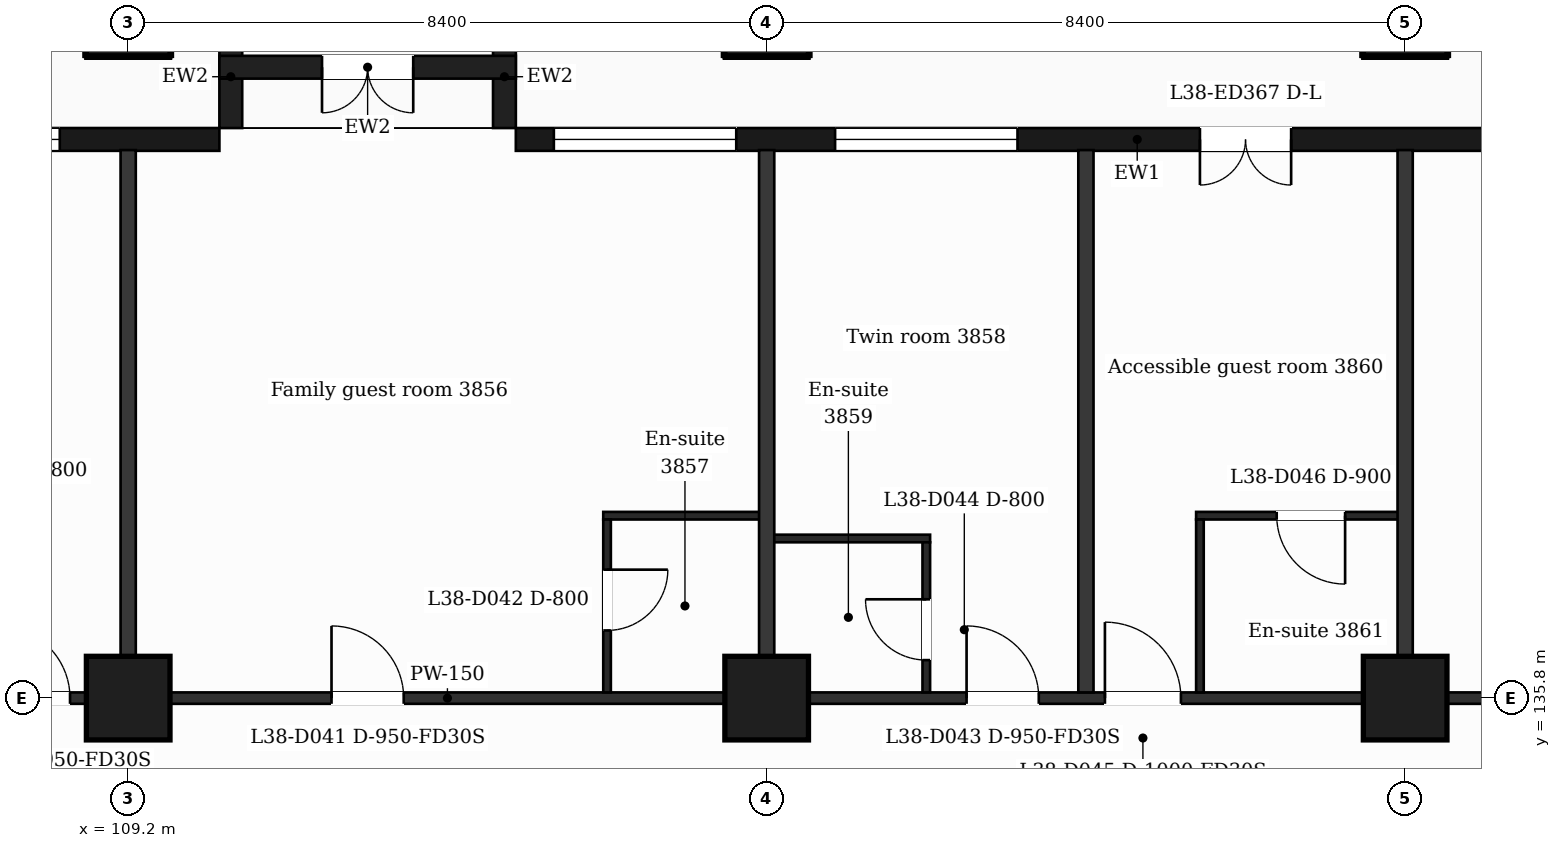
"""IFC4 building model, lengths in metres.
Left out: names, types, materials, properties, quantities, classifications, styles, units other than length and angle.
Written with IfcOpenShell. Run it as: python <this file> out.ifc"""

import sys

from ifc_helpers import new_model, si_unit, direction, frame, frame_2d, origin, origin_2d, place, context, subcontext, project, spatial, rectangle, extrude, element, fill, save


model = new_model("IFC4")
c1 = context("Model", 3, precision=1e-05, world=origin(), true_north=direction((0.0, 1.0)))
c2 = subcontext(c1, "Body", "Model", "MODEL_VIEW")
j1 = project(units=[si_unit("LENGTHUNIT", "METRE"), si_unit("PLANEANGLEUNIT", "RADIAN")], contexts=[c1])
p1 = place(None, origin())
s1 = spatial("IfcSite", under=j1, at=p1, CompositionType="ELEMENT")
p2 = place(p1, origin())
s2 = spatial("IfcBuilding", under=s1, at=p2, CompositionType="ELEMENT")
p3 = place(p2, frame((0.0, 0.0, 162.6)))
s3 = spatial("IfcBuildingStorey", under=s2, at=p3, CompositionType="ELEMENT", Elevation=162.6)
for number, where, z_axis, x_axis in (
    (1, (109.2, 135.8, 0.0), (0.0, 0.0, 1.0), (1.0, 0.0, 0.0)),
    (2, (117.6, 135.8, 0.0), (0.0, 0.0, 1.0), (1.0, 0.0, 0.0)),
    (3, (126.0, 135.8, 0.0), (0.0, 0.0, 1.0), (1.0, 0.0, 0.0)),
    (4, (109.2, 144.8, 0.0), (0.0, 0.0, 1.0), (1.0, 0.0, 0.0)),
    (5, (117.6, 144.8, 0.0), (0.0, 0.0, 1.0), (1.0, 0.0, 0.0)),
    (6, (126.0, 144.8, 0.0), (0.0, 0.0, 1.0), (1.0, 0.0, 0.0)),
):
    element("IfcColumn", number, at=place(p3, frame(where, z_axis=z_axis, x_axis=x_axis)), inside=s3, PredefinedType="COLUMN", context=c2, shape_type="SweptSolid", body=[
        extrude(rectangle(XDim=1.1, YDim=1.1, at=origin_2d()), origin(), (0.0, 0.0, 1.0), 3.7),
    ])
p4 = place(p3, frame((130.65, 143.15, 0.0), z_axis=(0.0, 0.0, 1.0), x_axis=(-1.0, 0.0, 0.0)))
e7 = element("IfcWall", 7, at=p4, inside=s3, PredefinedType="SOLIDWALL", context=c2, shape_type="SweptSolid", body=[
    extrude(rectangle(XDim=16.35, YDim=0.3, at=frame_2d((8.175, 0.0))), origin(), (0.0, 0.0, 1.0), 3.38),
])
p5 = place(p4, frame((1.95, 0.0, 0.9)))
e8 = element("IfcOpeningElement", 8, at=p5, cuts=e7, PredefinedType="OPENING", context=c2, shape_type="SweptSolid", body=[
    extrude(rectangle(XDim=1.2, YDim=2.1, at=frame_2d((0.6, 1.05))), frame((0.0, 0.16, 0.0), z_axis=(0.0, -1.0, 0.0), x_axis=(1.0, 0.0, 0.0)), (0.0, 0.0, 1.0), 0.32),
])
p6 = place(p4, frame((6.15, 0.0, 0.0)))
e9 = element("IfcOpeningElement", 9, at=p6, cuts=e7, PredefinedType="OPENING", context=c2, shape_type="SweptSolid", body=[
    extrude(rectangle(XDim=1.2, YDim=2.4, at=frame_2d((0.6, 1.2))), frame((0.0, 0.16, 0.0), z_axis=(0.0, -1.0, 0.0), x_axis=(1.0, 0.0, 0.0)), (0.0, 0.0, 1.0), 0.32),
])
p7 = place(p4, frame((9.75, 0.0, 0.9)))
e10 = element("IfcOpeningElement", 10, at=p7, cuts=e7, PredefinedType="OPENING", context=c2, shape_type="SweptSolid", body=[
    extrude(rectangle(XDim=2.4, YDim=2.1, at=frame_2d((1.2, 1.05))), frame((0.0, 0.16, 0.0), z_axis=(0.0, -1.0, 0.0), x_axis=(1.0, 0.0, 0.0)), (0.0, 0.0, 1.0), 0.32),
])
p8 = place(p4, frame((13.45, 0.0, 0.9)))
e11 = element("IfcOpeningElement", 11, at=p8, cuts=e7, PredefinedType="OPENING", context=c2, shape_type="SweptSolid", body=[
    extrude(rectangle(XDim=2.4, YDim=2.1, at=frame_2d((1.2, 1.05))), frame((0.0, 0.16, 0.0), z_axis=(0.0, -1.0, 0.0), x_axis=(1.0, 0.0, 0.0)), (0.0, 0.0, 1.0), 0.32),
])
p9 = place(p3, frame((110.4, 143.15, 0.0), z_axis=(0.0, 0.0, 1.0), x_axis=(-1.0, 0.0, 0.0)))
e12 = element("IfcWall", 12, at=p9, inside=s3, PredefinedType="SOLIDWALL", context=c2, shape_type="SweptSolid", body=[
    extrude(rectangle(XDim=14.4, YDim=0.3, at=frame_2d((7.2, 0.0))), origin(), (0.0, 0.0, 1.0), 3.38),
])
p10 = place(p9, frame((2.1, 0.0, 0.9)))
e13 = element("IfcOpeningElement", 13, at=p10, cuts=e12, PredefinedType="OPENING", context=c2, shape_type="SweptSolid", body=[
    extrude(rectangle(XDim=2.4, YDim=2.1, at=frame_2d((1.2, 1.05))), frame((0.0, 0.16, 0.0), z_axis=(0.0, -1.0, 0.0), x_axis=(1.0, 0.0, 0.0)), (0.0, 0.0, 1.0), 0.32),
])
p11 = place(p9, frame((6.9, 0.0, 0.0)))
e14 = element("IfcOpeningElement", 14, at=p11, cuts=e12, PredefinedType="OPENING", context=c2, shape_type="SweptSolid", body=[
    extrude(rectangle(XDim=1.2, YDim=2.4, at=frame_2d((0.6, 1.2))), frame((0.0, 0.16, 0.0), z_axis=(0.0, -1.0, 0.0), x_axis=(1.0, 0.0, 0.0)), (0.0, 0.0, 1.0), 0.32),
])
p12 = place(p9, frame((11.1, 0.0, 0.9)))
e15 = element("IfcOpeningElement", 15, at=p12, cuts=e12, PredefinedType="OPENING", context=c2, shape_type="SweptSolid", body=[
    extrude(rectangle(XDim=1.2, YDim=2.1, at=frame_2d((0.6, 1.05))), frame((0.0, 0.16, 0.0), z_axis=(0.0, -1.0, 0.0), x_axis=(1.0, 0.0, 0.0)), (0.0, 0.0, 1.0), 0.32),
])
for number, where, z_axis, x_axis in (
    (16, (114.15, 143.3, 0.0), (0.0, 0.0, 1.0), (0.0, 1.0, 0.0)),
    (17, (110.55, 143.3, 0.0), (0.0, 0.0, 1.0), (0.0, 1.0, 0.0)),
):
    element("IfcWall", number, at=place(p3, frame(where, z_axis=z_axis, x_axis=x_axis)), inside=s3, PredefinedType="SOLIDWALL", context=c2, shape_type="SweptSolid", body=[
        extrude(rectangle(XDim=1.35, YDim=0.3, at=frame_2d((0.675, 0.0))), origin(), (0.0, 0.0, 1.0), 3.38),
    ])
p13 = place(p3, frame((114.3, 144.1, 0.0), z_axis=(0.0, 0.0, 1.0), x_axis=(-1.0, 0.0, 0.0)))
e18 = element("IfcWall", 18, at=p13, inside=s3, PredefinedType="SOLIDWALL", context=c2, shape_type="SweptSolid", body=[
    extrude(rectangle(XDim=3.9, YDim=0.3, at=frame_2d((1.95, 0.0))), origin(), (0.0, 0.0, 1.0), 3.38),
])
p14 = place(p13, frame((1.35, 0.0, 0.0)))
e19 = element("IfcOpeningElement", 19, at=p14, cuts=e18, PredefinedType="OPENING", context=c2, shape_type="SweptSolid", body=[
    extrude(rectangle(XDim=1.2, YDim=2.4, at=frame_2d((0.6, 1.2))), frame((0.0, 0.16, 0.0), z_axis=(0.0, -1.0, 0.0), x_axis=(1.0, 0.0, 0.0)), (0.0, 0.0, 1.0), 0.32),
])
p15 = place(p3, frame((90.895, 135.8, 0.0), z_axis=(0.0, 0.0, 1.0), x_axis=(1.0, 0.0, 0.0)))
e20 = element("IfcWall", 20, at=p15, inside=s3, PredefinedType="PARTITIONING", context=c2, shape_type="SweptSolid", body=[
    extrude(rectangle(XDim=45.011, YDim=0.15, at=frame_2d((22.505, 0.0))), origin(), (0.0, 0.0, 1.0), 3.38),
])
p16 = place(p15, frame((8.005, 0.0, 0.0)))
e21 = element("IfcOpeningElement", 21, at=p16, cuts=e20, PredefinedType="OPENING", context=c2, shape_type="SweptSolid", body=[
    extrude(rectangle(XDim=1.0, YDim=2.1, at=frame_2d((0.5, 1.05))), frame((0.0, 0.085, 0.0), z_axis=(0.0, -1.0, 0.0), x_axis=(1.0, 0.0, 0.0)), (0.0, 0.0, 1.0), 0.17),
])
p17 = place(p15, frame((10.67, 0.0, 0.0)))
e22 = element("IfcOpeningElement", 22, at=p17, cuts=e20, PredefinedType="OPENING", context=c2, shape_type="SweptSolid", body=[
    extrude(rectangle(XDim=0.95, YDim=2.1, at=frame_2d((0.475, 1.05))), frame((0.0, 0.085, 0.0), z_axis=(0.0, -1.0, 0.0), x_axis=(1.0, 0.0, 0.0)), (0.0, 0.0, 1.0), 0.17),
])
p18 = place(p15, frame((16.59, 0.0, 0.0)))
e23 = element("IfcOpeningElement", 23, at=p18, cuts=e20, PredefinedType="OPENING", context=c2, shape_type="SweptSolid", body=[
    extrude(rectangle(XDim=0.95, YDim=2.1, at=frame_2d((0.475, 1.05))), frame((0.0, 0.085, 0.0), z_axis=(0.0, -1.0, 0.0), x_axis=(1.0, 0.0, 0.0)), (0.0, 0.0, 1.0), 0.17),
])
p19 = place(p15, frame((20.98, 0.0, 0.0)))
e24 = element("IfcOpeningElement", 24, at=p19, cuts=e20, PredefinedType="OPENING", context=c2, shape_type="SweptSolid", body=[
    extrude(rectangle(XDim=0.95, YDim=2.1, at=frame_2d((0.475, 1.05))), frame((0.0, 0.085, 0.0), z_axis=(0.0, -1.0, 0.0), x_axis=(1.0, 0.0, 0.0)), (0.0, 0.0, 1.0), 0.17),
])
p20 = place(p15, frame((29.335, 0.0, 0.0)))
e25 = element("IfcOpeningElement", 25, at=p20, cuts=e20, PredefinedType="OPENING", context=c2, shape_type="SweptSolid", body=[
    extrude(rectangle(XDim=0.95, YDim=2.1, at=frame_2d((0.475, 1.05))), frame((0.0, 0.085, 0.0), z_axis=(0.0, -1.0, 0.0), x_axis=(1.0, 0.0, 0.0)), (0.0, 0.0, 1.0), 0.17),
])
p21 = place(p15, frame((31.156, 0.0, 0.0)))
e26 = element("IfcOpeningElement", 26, at=p21, cuts=e20, PredefinedType="OPENING", context=c2, shape_type="SweptSolid", body=[
    extrude(rectangle(XDim=1.0, YDim=2.1, at=frame_2d((0.5, 1.05))), frame((0.0, 0.085, 0.0), z_axis=(0.0, -1.0, 0.0), x_axis=(1.0, 0.0, 0.0)), (0.0, 0.0, 1.0), 0.17),
])
p22 = place(p15, frame((39.814, 0.0, 0.0)))
e27 = element("IfcOpeningElement", 27, at=p22, cuts=e20, PredefinedType="OPENING", context=c2, shape_type="SweptSolid", body=[
    extrude(rectangle(XDim=0.95, YDim=2.1, at=frame_2d((0.475, 1.05))), frame((0.0, 0.085, 0.0), z_axis=(0.0, -1.0, 0.0), x_axis=(1.0, 0.0, 0.0)), (0.0, 0.0, 1.0), 0.17),
])
p23 = place(p3, frame((117.6, 137.9, 0.0), z_axis=(0.0, 0.0, 1.0), x_axis=(1.0, 0.0, 0.0)))
e28 = element("IfcWall", 28, at=p23, inside=s3, PredefinedType="PARTITIONING", context=c2, shape_type="SweptSolid", body=[
    extrude(rectangle(XDim=2.15, YDim=0.1, at=frame_2d((1.075, 0.0))), origin(), (0.0, 0.0, 1.0), 3.38),
])
p24 = place(p3, frame((115.45, 138.2, 0.0), z_axis=(0.0, 0.0, 1.0), x_axis=(1.0, 0.0, 0.0)))
e29 = element("IfcWall", 29, at=p24, inside=s3, PredefinedType="PARTITIONING", context=c2, shape_type="SweptSolid", body=[
    extrude(rectangle(XDim=2.15, YDim=0.1, at=frame_2d((1.075, 0.0))), origin(), (0.0, 0.0, 1.0), 3.38),
])
p25 = place(p3, frame((123.25, 138.2, 0.0), z_axis=(0.0, 0.0, 1.0), x_axis=(1.0, 0.0, 0.0)))
e30 = element("IfcWall", 30, at=p25, inside=s3, PredefinedType="PARTITIONING", context=c2, shape_type="SweptSolid", body=[
    extrude(rectangle(XDim=2.75, YDim=0.1, at=frame_2d((1.375, 0.0))), origin(), (0.0, 0.0, 1.0), 3.38),
])
p26 = place(p25, frame((1.06, 0.0, 0.0)))
e31 = element("IfcOpeningElement", 31, at=p26, cuts=e30, PredefinedType="OPENING", context=c2, shape_type="SweptSolid", body=[
    extrude(rectangle(XDim=0.9, YDim=2.1, at=frame_2d((0.45, 1.05))), frame((0.0, 0.06, 0.0), z_axis=(0.0, -1.0, 0.0), x_axis=(1.0, 0.0, 0.0)), (0.0, 0.0, 1.0), 0.12),
])
p27 = place(p3, frame((109.2, 135.875, 0.0), z_axis=(0.0, 0.0, 1.0), x_axis=(0.0, 1.0, 0.0)))
e32 = element("IfcWall", 32, at=p27, inside=s3, PredefinedType="PARTITIONING", context=c2, shape_type="SweptSolid", body=[
    extrude(rectangle(XDim=7.135, YDim=0.2, at=frame_2d((3.567, 0.0))), origin(), (0.0, 0.0, 1.0), 3.38),
])
p28 = place(p3, frame((115.5, 135.875, 0.0), z_axis=(0.0, 0.0, 1.0), x_axis=(0.0, 1.0, 0.0)))
e33 = element("IfcWall", 33, at=p28, inside=s3, PredefinedType="PARTITIONING", context=c2, shape_type="SweptSolid", body=[
    extrude(rectangle(XDim=2.275, YDim=0.1, at=frame_2d((1.137, 0.0))), origin(), (0.0, 0.0, 1.0), 3.38),
])
p29 = place(p28, frame((0.815, 0.0, 0.0)))
e34 = element("IfcOpeningElement", 34, at=p29, cuts=e33, PredefinedType="OPENING", context=c2, shape_type="SweptSolid", body=[
    extrude(rectangle(XDim=0.8, YDim=2.1, at=frame_2d((0.4, 1.05))), frame((0.0, 0.06, 0.0), z_axis=(0.0, -1.0, 0.0), x_axis=(1.0, 0.0, 0.0)), (0.0, 0.0, 1.0), 0.12),
])
p30 = place(p3, frame((117.6, 135.875, 0.0), z_axis=(0.0, 0.0, 1.0), x_axis=(0.0, 1.0, 0.0)))
e35 = element("IfcWall", 35, at=p30, inside=s3, PredefinedType="PARTITIONING", context=c2, shape_type="SweptSolid", body=[
    extrude(rectangle(XDim=7.135, YDim=0.2, at=frame_2d((3.567, 0.0))), origin(), (0.0, 0.0, 1.0), 3.38),
])
p31 = place(p3, frame((119.7, 135.875, 0.0), z_axis=(0.0, 0.0, 1.0), x_axis=(0.0, 1.0, 0.0)))
e36 = element("IfcWall", 36, at=p31, inside=s3, PredefinedType="PARTITIONING", context=c2, shape_type="SweptSolid", body=[
    extrude(rectangle(XDim=1.975, YDim=0.1, at=frame_2d((0.988, 0.0))), origin(), (0.0, 0.0, 1.0), 3.38),
])
p32 = place(p31, frame((0.425, 0.0, 0.0)))
e37 = element("IfcOpeningElement", 37, at=p32, cuts=e36, PredefinedType="OPENING", context=c2, shape_type="SweptSolid", body=[
    extrude(rectangle(XDim=0.8, YDim=2.1, at=frame_2d((0.4, 1.05))), frame((0.0, 0.06, 0.0), z_axis=(0.0, -1.0, 0.0), x_axis=(1.0, 0.0, 0.0)), (0.0, 0.0, 1.0), 0.12),
])
p33 = place(p3, frame((121.8, 135.875, 0.0), z_axis=(0.0, 0.0, 1.0), x_axis=(0.0, 1.0, 0.0)))
e38 = element("IfcWall", 38, at=p33, inside=s3, PredefinedType="PARTITIONING", context=c2, shape_type="SweptSolid", body=[
    extrude(rectangle(XDim=7.135, YDim=0.2, at=frame_2d((3.567, 0.0))), origin(), (0.0, 0.0, 1.0), 3.38),
])
p34 = place(p3, frame((123.3, 135.875, 0.0), z_axis=(0.0, 0.0, 1.0), x_axis=(0.0, 1.0, 0.0)))
e39 = element("IfcWall", 39, at=p34, inside=s3, PredefinedType="PARTITIONING", context=c2, shape_type="SweptSolid", body=[
    extrude(rectangle(XDim=2.275, YDim=0.1, at=frame_2d((1.137, 0.0))), origin(), (0.0, 0.0, 1.0), 3.38),
])
p35 = place(p3, frame((126.0, 135.875, 0.0), z_axis=(0.0, 0.0, 1.0), x_axis=(0.0, 1.0, 0.0)))
e40 = element("IfcWall", 40, at=p35, inside=s3, PredefinedType="PARTITIONING", context=c2, shape_type="SweptSolid", body=[
    extrude(rectangle(XDim=7.135, YDim=0.2, at=frame_2d((3.567, 0.0))), origin(), (0.0, 0.0, 1.0), 3.38),
])
p36 = place(p6, origin())
e41 = element("IfcDoor", 41, at=p36, inside=s3, OperationType="DOUBLE_DOOR_SINGLE_SWING", PredefinedType="DOOR", context=c2, shape_type="SweptSolid", body=[
    extrude(rectangle(XDim=1.2, YDim=2.4, at=frame_2d((0.6, 1.2))), frame((0.0, 0.025, 0.0), z_axis=(0.0, -1.0, 0.0), x_axis=(1.0, 0.0, 0.0)), (0.0, 0.0, 1.0), 0.05),
])
fill(e9, e41)
p37 = place(p7, origin())
e42 = element("IfcWindow", 42, at=p37, inside=s3, PartitioningType="SINGLE_PANEL", PredefinedType="WINDOW", context=c2, shape_type="SweptSolid", body=[
    extrude(rectangle(XDim=2.4, YDim=2.1, at=frame_2d((1.2, 1.05))), frame((0.0, 0.03, 0.0), z_axis=(0.0, -1.0, 0.0), x_axis=(1.0, 0.0, 0.0)), (0.0, 0.0, 1.0), 0.06),
])
fill(e10, e42)
p38 = place(p8, origin())
e43 = element("IfcWindow", 43, at=p38, inside=s3, PartitioningType="SINGLE_PANEL", PredefinedType="WINDOW", context=c2, shape_type="SweptSolid", body=[
    extrude(rectangle(XDim=2.4, YDim=2.1, at=frame_2d((1.2, 1.05))), frame((0.0, 0.03, 0.0), z_axis=(0.0, -1.0, 0.0), x_axis=(1.0, 0.0, 0.0)), (0.0, 0.0, 1.0), 0.06),
])
fill(e11, e43)
p39 = place(p10, origin())
e44 = element("IfcWindow", 44, at=p39, inside=s3, PartitioningType="SINGLE_PANEL", PredefinedType="WINDOW", context=c2, shape_type="SweptSolid", body=[
    extrude(rectangle(XDim=2.4, YDim=2.1, at=frame_2d((1.2, 1.05))), frame((0.0, 0.03, 0.0), z_axis=(0.0, -1.0, 0.0), x_axis=(1.0, 0.0, 0.0)), (0.0, 0.0, 1.0), 0.06),
])
fill(e13, e44)
p40 = place(p14, origin())
e45 = element("IfcDoor", 45, at=p40, inside=s3, OperationType="DOUBLE_DOOR_SINGLE_SWING", PredefinedType="DOOR", context=c2, shape_type="SweptSolid", body=[
    extrude(rectangle(XDim=1.2, YDim=2.4, at=frame_2d((0.6, 1.2))), frame((0.0, 0.025, 0.0), z_axis=(0.0, -1.0, 0.0), x_axis=(1.0, 0.0, 0.0)), (0.0, 0.0, 1.0), 0.05),
])
fill(e19, e45)
p41 = place(p18, origin())
e46 = element("IfcDoor", 46, at=p41, inside=s3, OperationType="SINGLE_SWING_LEFT", PredefinedType="DOOR", context=c2, shape_type="SweptSolid", body=[
    extrude(rectangle(XDim=0.95, YDim=2.1, at=frame_2d((0.475, 1.05))), frame((0.0, 0.025, 0.0), z_axis=(0.0, -1.0, 0.0), x_axis=(1.0, 0.0, 0.0)), (0.0, 0.0, 1.0), 0.05),
])
fill(e23, e46)
p42 = place(p19, origin())
e47 = element("IfcDoor", 47, at=p42, inside=s3, OperationType="SINGLE_SWING_LEFT", PredefinedType="DOOR", context=c2, shape_type="SweptSolid", body=[
    extrude(rectangle(XDim=0.95, YDim=2.1, at=frame_2d((0.475, 1.05))), frame((0.0, 0.025, 0.0), z_axis=(0.0, -1.0, 0.0), x_axis=(1.0, 0.0, 0.0)), (0.0, 0.0, 1.0), 0.05),
])
fill(e24, e47)
p43 = place(p29, origin())
e48 = element("IfcDoor", 48, at=p43, inside=s3, OperationType="SINGLE_SWING_RIGHT", PredefinedType="DOOR", context=c2, shape_type="SweptSolid", body=[
    extrude(rectangle(XDim=0.8, YDim=2.1, at=frame_2d((0.4, 1.05))), frame((0.0, 0.025, 0.0), z_axis=(0.0, -1.0, 0.0), x_axis=(1.0, 0.0, 0.0)), (0.0, 0.0, 1.0), 0.05),
])
fill(e34, e48)
p44 = place(p20, origin())
e49 = element("IfcDoor", 49, at=p44, inside=s3, OperationType="SINGLE_SWING_LEFT", PredefinedType="DOOR", context=c2, shape_type="SweptSolid", body=[
    extrude(rectangle(XDim=0.95, YDim=2.1, at=frame_2d((0.475, 1.05))), frame((0.0, 0.025, 0.0), z_axis=(0.0, -1.0, 0.0), x_axis=(1.0, 0.0, 0.0)), (0.0, 0.0, 1.0), 0.05),
])
fill(e25, e49)
p45 = place(p32, origin())
e50 = element("IfcDoor", 50, at=p45, inside=s3, OperationType="SINGLE_SWING_RIGHT", PredefinedType="DOOR", context=c2, shape_type="SweptSolid", body=[
    extrude(rectangle(XDim=0.8, YDim=2.1, at=frame_2d((0.4, 1.05))), frame((0.0, 0.025, 0.0), z_axis=(0.0, -1.0, 0.0), x_axis=(1.0, 0.0, 0.0)), (0.0, 0.0, 1.0), 0.05),
])
fill(e37, e50)
p46 = place(p21, origin())
e51 = element("IfcDoor", 51, at=p46, inside=s3, OperationType="SINGLE_SWING_LEFT", PredefinedType="DOOR", context=c2, shape_type="SweptSolid", body=[
    extrude(rectangle(XDim=1.0, YDim=2.1, at=frame_2d((0.5, 1.05))), frame((0.0, 0.025, 0.0), z_axis=(0.0, -1.0, 0.0), x_axis=(1.0, 0.0, 0.0)), (0.0, 0.0, 1.0), 0.05),
])
fill(e26, e51)
p47 = place(p26, origin())
e52 = element("IfcDoor", 52, at=p47, inside=s3, OperationType="SINGLE_SWING_RIGHT", PredefinedType="DOOR", context=c2, shape_type="SweptSolid", body=[
    extrude(rectangle(XDim=0.9, YDim=2.1, at=frame_2d((0.45, 1.05))), frame((0.0, 0.025, 0.0), z_axis=(0.0, -1.0, 0.0), x_axis=(1.0, 0.0, 0.0)), (0.0, 0.0, 1.0), 0.05),
])
fill(e31, e52)
save(model, sys.argv[1])
